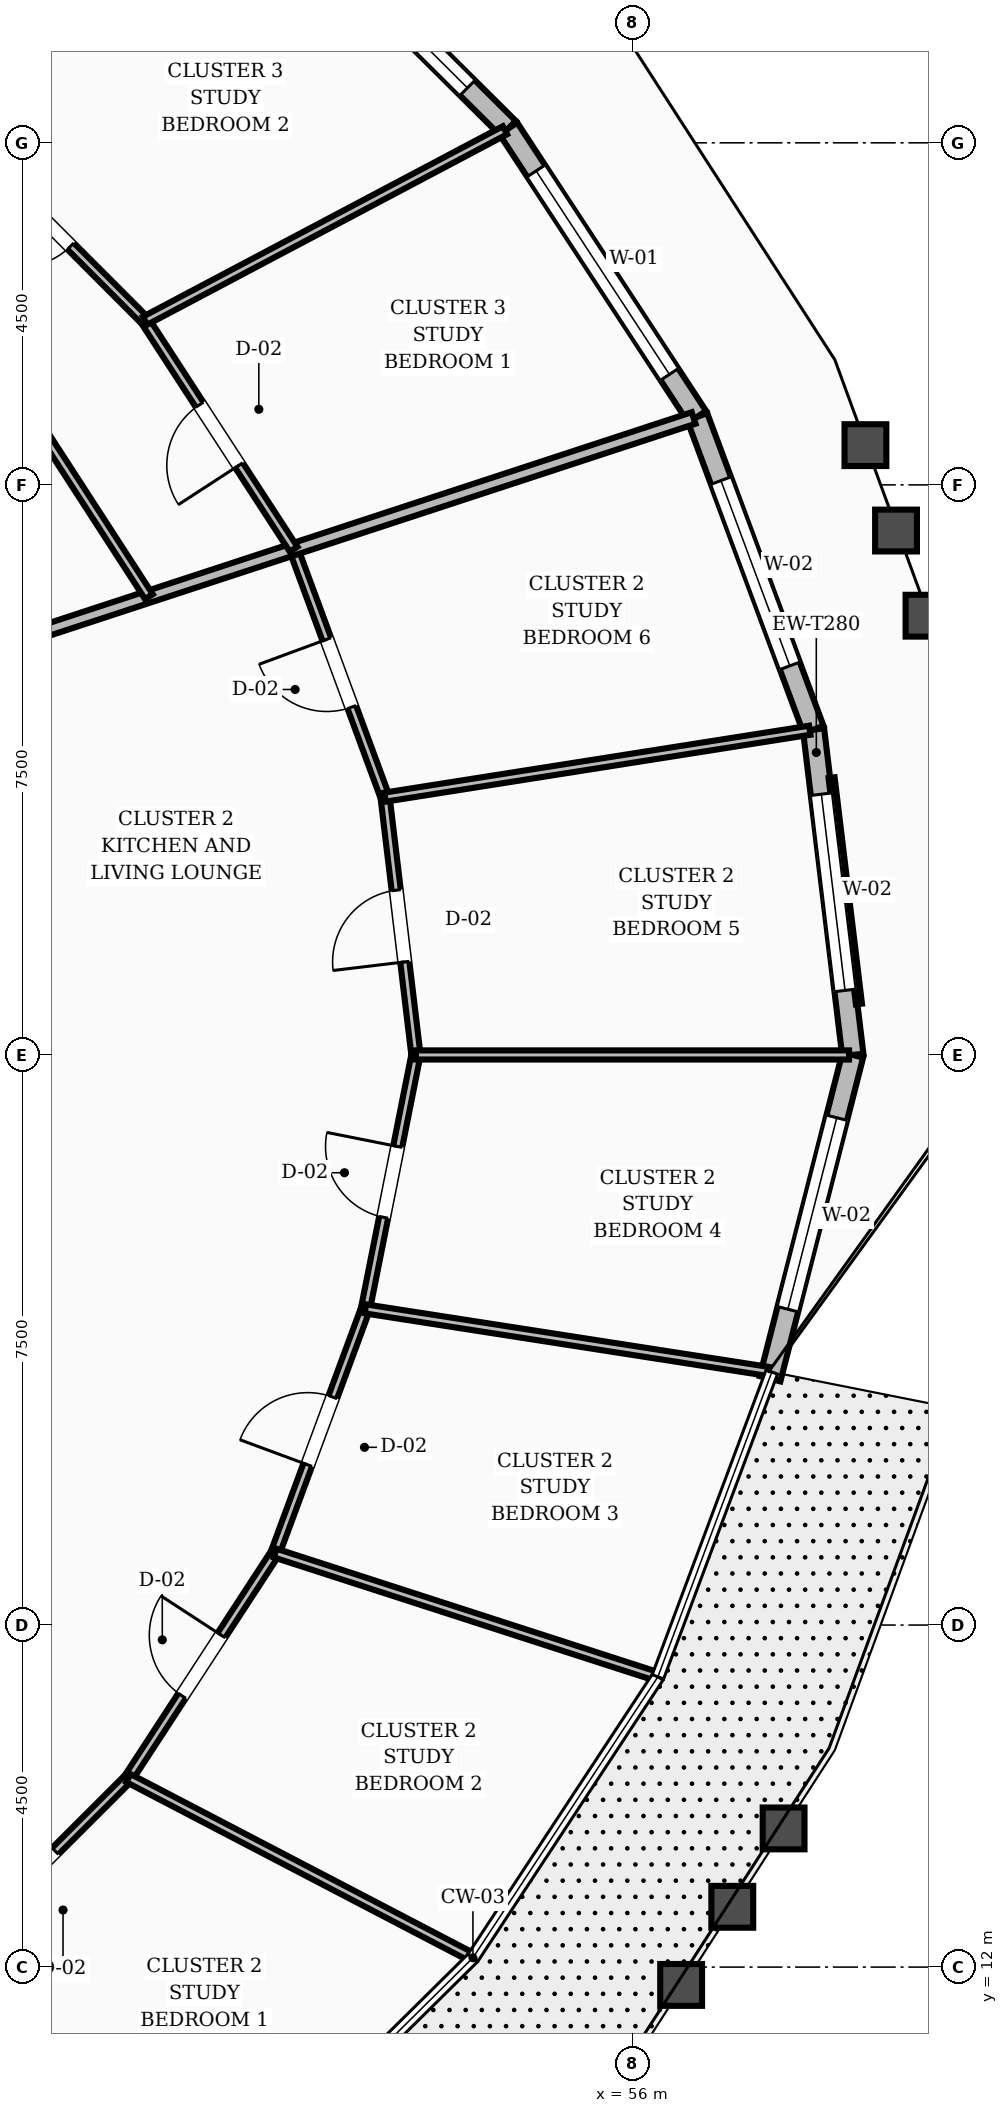
"""IFC4 building model, lengths in metres.
Left out: names, types, materials, properties, quantities, classifications, styles, units other than length and angle.
Written with IfcOpenShell. Run it as: python <this file> out.ifc"""

import sys

from ifc_helpers import new_model, si_unit, direction, frame, frame_2d, origin, place, context, subcontext, project, spatial, rectangle, extrude, element, fill, save


model = new_model("IFC4")
c1 = context("Model", 3, precision=1e-05, world=origin(), true_north=direction((0.0, 1.0)))
c2 = subcontext(c1, "Body", "Model", "MODEL_VIEW")
j1 = project(units=[si_unit("LENGTHUNIT", "METRE"), si_unit("PLANEANGLEUNIT", "RADIAN")], contexts=[c1])
p1 = place(None, origin())
s1 = spatial("IfcSite", under=j1, at=p1, CompositionType="ELEMENT")
p2 = place(p1, origin())
s2 = spatial("IfcBuilding", under=s1, at=p2, CompositionType="ELEMENT")
p3 = place(p2, frame((0.0, 0.0, 98.8)))
s3 = spatial("IfcBuildingStorey", under=s2, at=p3, CompositionType="ELEMENT", Elevation=98.8)
p4 = place(p3, frame((58.895, 24.0, 0.0), z_axis=(0.0, 0.0, 1.0), x_axis=(-0.119886563343, 0.992787596583, 0.0)))
e1 = element("IfcWall", 1, at=p4, inside=s3, PredefinedType="STANDARD", context=c2, shape_type="SweptSolid", body=[
    extrude(rectangle(XDim=4.311, YDim=0.28, at=frame_2d((2.156, 0.0))), origin(), (0.0, 0.0, 1.0), 2.71),
])
p5 = place(p4, frame((0.855, 0.0, 0.8)))
e2 = element("IfcOpeningElement", 2, at=p5, cuts=e1, PredefinedType="OPENING", context=c2, shape_type="SweptSolid", body=[
    extrude(rectangle(XDim=2.6, YDim=1.65, at=frame_2d((1.3, 0.825))), frame((0.0, 0.15, 0.0), z_axis=(0.0, -1.0, 0.0), x_axis=(1.0, 0.0, 0.0)), (0.0, 0.0, 1.0), 0.3),
])
p6 = place(p3, frame((58.378, 28.28, 0.0), z_axis=(0.0, 0.0, 1.0), x_axis=(-0.348569013741, 0.937283117665, 0.0)))
e3 = element("IfcWall", 3, at=p6, inside=s3, PredefinedType="STANDARD", context=c2, shape_type="SweptSolid", body=[
    extrude(rectangle(XDim=4.391, YDim=0.28, at=frame_2d((2.195, 0.0))), origin(), (0.0, 0.0, 1.0), 2.71),
])
p7 = place(p6, frame((0.896, 0.0, 0.8)))
e4 = element("IfcOpeningElement", 4, at=p7, cuts=e3, PredefinedType="OPENING", context=c2, shape_type="SweptSolid", body=[
    extrude(rectangle(XDim=2.6, YDim=1.65, at=frame_2d((1.3, 0.825))), frame((0.0, 0.15, 0.0), z_axis=(0.0, -1.0, 0.0), x_axis=(1.0, 0.0, 0.0)), (0.0, 0.0, 1.0), 0.3),
])
p8 = place(p3, frame((56.848, 32.396, 0.0), z_axis=(0.0, 0.0, 1.0), x_axis=(-0.548073017765, 0.836430491552, 0.0)))
e5 = element("IfcWall", 5, at=p8, inside=s3, PredefinedType="STANDARD", context=c2, shape_type="SweptSolid", body=[
    extrude(rectangle(XDim=4.535, YDim=0.28, at=frame_2d((2.267, 0.0))), origin(), (0.0, 0.0, 1.0), 2.71),
])
p9 = place(p8, frame((0.667, 0.0, 0.8)))
e6 = element("IfcOpeningElement", 6, at=p9, cuts=e5, PredefinedType="OPENING", context=c2, shape_type="SweptSolid", body=[
    extrude(rectangle(XDim=3.2, YDim=1.65, at=frame_2d((1.6, 0.825))), frame((0.0, 0.15, 0.0), z_axis=(0.0, -1.0, 0.0), x_axis=(1.0, 0.0, 0.0)), (0.0, 0.0, 1.0), 0.3),
])
p10 = place(p3, frame((54.362, 36.188, 0.0), z_axis=(0.0, 0.0, 1.0), x_axis=(-0.709251981277, 0.704955053216, 0.0)))
e7 = element("IfcWall", 7, at=p10, inside=s3, PredefinedType="STANDARD", context=c2, shape_type="SweptSolid", body=[
    extrude(rectangle(XDim=4.716, YDim=0.28, at=frame_2d((2.358, 0.0))), origin(), (0.0, 0.0, 1.0), 2.71),
])
p11 = place(p10, frame((0.758, 0.0, 0.8)))
e8 = element("IfcOpeningElement", 8, at=p11, cuts=e7, PredefinedType="OPENING", context=c2, shape_type="SweptSolid", body=[
    extrude(rectangle(XDim=3.2, YDim=1.65, at=frame_2d((1.6, 0.825))), frame((0.0, 0.15, 0.0), z_axis=(0.0, -1.0, 0.0), x_axis=(1.0, 0.0, 0.0)), (0.0, 0.0, 1.0), 0.3),
])
p12 = place(p3, frame((57.806, 19.74, 0.0), z_axis=(0.0, 0.0, 1.0), x_axis=(0.247653865661, 0.968848575797, 0.0)))
e9 = element("IfcWall", 9, at=p12, inside=s3, PredefinedType="STANDARD", context=c2, shape_type="SweptSolid", body=[
    extrude(rectangle(XDim=4.397, YDim=0.28, at=frame_2d((2.198, 0.0))), origin(), (0.0, 0.0, 1.0), 2.71),
])
p13 = place(p12, frame((0.944, 0.0, 0.8)))
e10 = element("IfcOpeningElement", 10, at=p13, cuts=e9, PredefinedType="OPENING", context=c2, shape_type="SweptSolid", body=[
    extrude(rectangle(XDim=2.6, YDim=1.65, at=frame_2d((1.3, 0.825))), frame((0.0, 0.15, 0.0), z_axis=(0.0, -1.0, 0.0), x_axis=(1.0, 0.0, 0.0)), (0.0, 0.0, 1.0), 0.3),
])
p14 = place(p3, frame((43.349, 14.56, 0.0), z_axis=(0.0, 0.0, 1.0), x_axis=(0.788270771637, -0.615328522484, 0.0)))
e11 = element("IfcWall", 11, at=p14, inside=s3, PredefinedType="SOLIDWALL", context=c2, shape_type="SweptSolid", body=[
    extrude(rectangle(XDim=9.176, YDim=0.16, at=frame_2d((4.588, 0.0))), origin(), (0.0, 0.0, 1.0), 2.71),
])
p15 = place(p3, frame((46.767, 11.892, 0.0), z_axis=(0.0, 0.0, 1.0), x_axis=(0.707439177494, 0.706774228553, 0.0)))
e12 = element("IfcWall", 12, at=p15, inside=s3, PredefinedType="PARTITIONING", context=c2, shape_type="SweptSolid", body=[
    extrude(rectangle(XDim=3.672, YDim=0.12, at=frame_2d((1.836, 0.0))), origin(), (0.0, 0.0, 1.0), 2.71),
])
p16 = place(p15, frame((1.361, 0.0, 0.0)))
e13 = element("IfcOpeningElement", 13, at=p16, cuts=e12, PredefinedType="OPENING", context=c2, shape_type="SweptSolid", body=[
    extrude(rectangle(XDim=0.95, YDim=2.1, at=frame_2d((0.475, 1.05))), frame((0.0, 0.07, 0.0), z_axis=(0.0, -1.0, 0.0), x_axis=(1.0, 0.0, 0.0)), (0.0, 0.0, 1.0), 0.14),
])
p17 = place(p3, frame((49.365, 14.487, 0.0), z_axis=(0.0, 0.0, 1.0), x_axis=(0.546061236872, 0.837745262944, 0.0)))
e14 = element("IfcWall", 14, at=p17, inside=s3, PredefinedType="PARTITIONING", context=c2, shape_type="SweptSolid", body=[
    extrude(rectangle(XDim=3.534, YDim=0.12, at=frame_2d((1.767, 0.0))), origin(), (0.0, 0.0, 1.0), 2.71),
])
p18 = place(p17, frame((1.292, 0.0, 0.0)))
e15 = element("IfcOpeningElement", 15, at=p18, cuts=e14, PredefinedType="OPENING", context=c2, shape_type="SweptSolid", body=[
    extrude(rectangle(XDim=0.95, YDim=2.1, at=frame_2d((0.475, 1.05))), frame((0.0, 0.07, 0.0), z_axis=(0.0, -1.0, 0.0), x_axis=(1.0, 0.0, 0.0)), (0.0, 0.0, 1.0), 0.14),
])
p19 = place(p3, frame((49.365, 14.487, 0.0), z_axis=(0.0, 0.0, 1.0), x_axis=(0.886626981738, -0.462485237877, 0.0)))
e16 = element("IfcWall", 16, at=p19, inside=s3, PredefinedType="PARTITIONING", context=c2, shape_type="SweptSolid", body=[
    extrude(rectangle(XDim=5.062, YDim=0.12, at=frame_2d((2.531, 0.0))), origin(), (0.0, 0.0, 1.0), 2.71),
])
p20 = place(p3, frame((51.294, 17.447, 0.0), z_axis=(0.0, 0.0, 1.0), x_axis=(0.347003238875, 0.937863930541, 0.0)))
e17 = element("IfcWall", 17, at=p20, inside=s3, PredefinedType="PARTITIONING", context=c2, shape_type="SweptSolid", body=[
    extrude(rectangle(XDim=3.425, YDim=0.12, at=frame_2d((1.712, 0.0))), origin(), (0.0, 0.0, 1.0), 2.71),
])
p21 = place(p20, frame((1.238, 0.0, 0.0)))
e18 = element("IfcOpeningElement", 18, at=p21, cuts=e17, PredefinedType="OPENING", context=c2, shape_type="SweptSolid", body=[
    extrude(rectangle(XDim=0.95, YDim=2.1, at=frame_2d((0.475, 1.05))), frame((0.0, 0.07, 0.0), z_axis=(0.0, -1.0, 0.0), x_axis=(1.0, 0.0, 0.0)), (0.0, 0.0, 1.0), 0.14),
])
p22 = place(p3, frame((51.294, 17.447, 0.0), z_axis=(0.0, 0.0, 1.0), x_axis=(0.951494646127, -0.307665302548, 0.0)))
e19 = element("IfcWall", 19, at=p22, inside=s3, PredefinedType="PARTITIONING", context=c2, shape_type="SweptSolid", body=[
    extrude(rectangle(XDim=5.243, YDim=0.12, at=frame_2d((2.622, 0.0))), origin(), (0.0, 0.0, 1.0), 2.71),
])
p23 = place(p3, frame((52.483, 20.659, 0.0), z_axis=(0.0, 0.0, 1.0), x_axis=(0.195109771399, 0.98078141148, 0.0)))
e20 = element("IfcWall", 20, at=p23, inside=s3, PredefinedType="PARTITIONING", context=c2, shape_type="SweptSolid", body=[
    extrude(rectangle(XDim=3.406, YDim=0.12, at=frame_2d((1.703, 0.0))), origin(), (0.0, 0.0, 1.0), 2.71),
])
p24 = place(p23, frame((1.228, 0.0, 0.0)))
e21 = element("IfcOpeningElement", 21, at=p24, cuts=e20, PredefinedType="OPENING", context=c2, shape_type="SweptSolid", body=[
    extrude(rectangle(XDim=0.95, YDim=2.1, at=frame_2d((0.475, 1.05))), frame((0.0, 0.07, 0.0), z_axis=(0.0, -1.0, 0.0), x_axis=(1.0, 0.0, 0.0)), (0.0, 0.0, 1.0), 0.14),
])
p25 = place(p3, frame((52.483, 20.659, 0.0), z_axis=(0.0, 0.0, 1.0), x_axis=(0.988157477478, -0.15344314812, 0.0)))
e22 = element("IfcWall", 22, at=p25, inside=s3, PredefinedType="PARTITIONING", context=c2, shape_type="SweptSolid", body=[
    extrude(rectangle(XDim=5.36, YDim=0.12, at=frame_2d((2.68, 0.0))), origin(), (0.0, 0.0, 1.0), 2.71),
])
p26 = place(p3, frame((53.147, 24.0, 0.0), z_axis=(0.0, 0.0, 1.0), x_axis=(-0.118984598137, 0.992896100006, 0.0)))
e23 = element("IfcWall", 23, at=p26, inside=s3, PredefinedType="PARTITIONING", context=c2, shape_type="SweptSolid", body=[
    extrude(rectangle(XDim=3.416, YDim=0.12, at=frame_2d((1.708, 0.0))), origin(), (0.0, 0.0, 1.0), 2.71),
])
p27 = place(p26, frame((1.233, 0.0, 0.0)))
e24 = element("IfcOpeningElement", 24, at=p27, cuts=e23, PredefinedType="OPENING", context=c2, shape_type="SweptSolid", body=[
    extrude(rectangle(XDim=0.95, YDim=2.1, at=frame_2d((0.475, 1.05))), frame((0.0, 0.07, 0.0), z_axis=(0.0, -1.0, 0.0), x_axis=(1.0, 0.0, 0.0)), (0.0, 0.0, 1.0), 0.14),
])
p28 = place(p3, frame((53.147, 24.0, 0.0), z_axis=(0.0, 0.0, 1.0), x_axis=(1.0, 0.0, 0.0)))
e25 = element("IfcWall", 25, at=p28, inside=s3, PredefinedType="PARTITIONING", context=c2, shape_type="SweptSolid", body=[
    extrude(rectangle(XDim=5.698, YDim=0.12, at=frame_2d((2.849, 0.0))), origin(), (0.0, 0.0, 1.0), 2.71),
])
p29 = place(p3, frame((52.741, 27.392, 0.0), z_axis=(0.0, 0.0, 1.0), x_axis=(-0.346154436664, 0.938177545019, 0.0)))
e26 = element("IfcWall", 26, at=p29, inside=s3, PredefinedType="PARTITIONING", context=c2, shape_type="SweptSolid", body=[
    extrude(rectangle(XDim=3.476, YDim=0.12, at=frame_2d((1.738, 0.0))), origin(), (0.0, 0.0, 1.0), 2.71),
])
p30 = place(p29, frame((1.263, 0.0, 0.0)))
e27 = element("IfcOpeningElement", 27, at=p30, cuts=e26, PredefinedType="OPENING", context=c2, shape_type="SweptSolid", body=[
    extrude(rectangle(XDim=0.95, YDim=2.1, at=frame_2d((0.475, 1.05))), frame((0.0, 0.07, 0.0), z_axis=(0.0, -1.0, 0.0), x_axis=(1.0, 0.0, 0.0)), (0.0, 0.0, 1.0), 0.14),
])
p31 = place(p3, frame((52.741, 27.392, 0.0), z_axis=(0.0, 0.0, 1.0), x_axis=(0.987823078451, 0.155581379607, 0.0)))
e28 = element("IfcWall", 28, at=p31, inside=s3, PredefinedType="PARTITIONING", context=c2, shape_type="SweptSolid", body=[
    extrude(rectangle(XDim=5.657, YDim=0.12, at=frame_2d((2.829, 0.0))), origin(), (0.0, 0.0, 1.0), 2.71),
])
p32 = place(p3, frame((46.828, 29.109, 0.0), z_axis=(0.0, 0.0, 1.0), x_axis=(0.950186855509, 0.311680829725, 0.0)))
e29 = element("IfcWall", 29, at=p32, inside=s3, PredefinedType="SOLIDWALL", context=c2, shape_type="SweptSolid", body=[
    extrude(rectangle(XDim=10.495, YDim=0.16, at=frame_2d((5.247, 0.0))), origin(), (0.0, 0.0, 1.0), 2.71),
])
p33 = place(p3, frame((49.634, 30.029, 0.0), z_axis=(0.0, 0.0, 1.0), x_axis=(-0.543556944185, 0.839372294294, 0.0)))
e30 = element("IfcWall", 30, at=p33, inside=s3, PredefinedType="PARTITIONING", context=c2, shape_type="SweptSolid", body=[
    extrude(rectangle(XDim=3.245, YDim=0.12, at=frame_2d((1.623, 0.0))), origin(), (0.0, 0.0, 1.0), 2.71),
])
p34 = place(p3, frame((51.537, 30.654, 0.0), z_axis=(0.0, 0.0, 1.0), x_axis=(-0.545045794667, 0.838406274855, 0.0)))
e31 = element("IfcWall", 31, at=p34, inside=s3, PredefinedType="PARTITIONING", context=c2, shape_type="SweptSolid", body=[
    extrude(rectangle(XDim=3.585, YDim=0.12, at=frame_2d((1.792, 0.0))), origin(), (0.0, 0.0, 1.0), 2.71),
])
p35 = place(p34, frame((1.318, 0.0, 0.0)))
e32 = element("IfcOpeningElement", 32, at=p35, cuts=e31, PredefinedType="OPENING", context=c2, shape_type="SweptSolid", body=[
    extrude(rectangle(XDim=0.95, YDim=2.1, at=frame_2d((0.475, 1.05))), frame((0.0, 0.07, 0.0), z_axis=(0.0, -1.0, 0.0), x_axis=(1.0, 0.0, 0.0)), (0.0, 0.0, 1.0), 0.14),
])
p36 = place(p3, frame((49.583, 33.659, 0.0), z_axis=(0.0, 0.0, 1.0), x_axis=(-0.706450655804, 0.707762298314, 0.0)))
e33 = element("IfcWall", 33, at=p36, inside=s3, PredefinedType="PARTITIONING", context=c2, shape_type="SweptSolid", body=[
    extrude(rectangle(XDim=3.723, YDim=0.12, at=frame_2d((1.861, 0.0))), origin(), (0.0, 0.0, 1.0), 2.71),
])
p37 = place(p36, frame((1.386, 0.0, 0.0)))
e34 = element("IfcOpeningElement", 34, at=p37, cuts=e33, PredefinedType="OPENING", context=c2, shape_type="SweptSolid", body=[
    extrude(rectangle(XDim=0.95, YDim=2.1, at=frame_2d((0.475, 1.05))), frame((0.0, 0.07, 0.0), z_axis=(0.0, -1.0, 0.0), x_axis=(1.0, 0.0, 0.0)), (0.0, 0.0, 1.0), 0.14),
])
p38 = place(p3, frame((49.583, 33.659, 0.0), z_axis=(0.0, 0.0, 1.0), x_axis=(0.883871044987, 0.467730665912, 0.0)))
e35 = element("IfcWall", 35, at=p38, inside=s3, PredefinedType="PARTITIONING", context=c2, shape_type="SweptSolid", body=[
    extrude(rectangle(XDim=5.357, YDim=0.12, at=frame_2d((2.678, 0.0))), origin(), (0.0, 0.0, 1.0), 2.71),
])
p39 = place(p3, frame((46.953, 36.294, 0.0), z_axis=(0.0, 0.0, 1.0), x_axis=(0.783934932715, 0.620842992446, 0.0)))
e36 = element("IfcWall", 36, at=p39, inside=s3, PredefinedType="PARTITIONING", context=c2, shape_type="SweptSolid", body=[
    extrude(rectangle(XDim=5.135, YDim=0.12, at=frame_2d((2.567, 0.0))), origin(), (0.0, 0.0, 1.0), 2.71),
])
p40 = place(p5, origin())
e37 = element("IfcWindow", 37, at=p40, inside=s3, PartitioningType="SINGLE_PANEL", PredefinedType="WINDOW", context=c2, shape_type="SweptSolid", body=[
    extrude(rectangle(XDim=2.6, YDim=1.65, at=frame_2d((1.3, 0.825))), frame((0.0, 0.03, 0.0), z_axis=(0.0, -1.0, 0.0), x_axis=(1.0, 0.0, 0.0)), (0.0, 0.0, 1.0), 0.06),
])
fill(e2, e37)
p41 = place(p7, origin())
e38 = element("IfcWindow", 38, at=p41, inside=s3, PartitioningType="SINGLE_PANEL", PredefinedType="WINDOW", context=c2, shape_type="SweptSolid", body=[
    extrude(rectangle(XDim=2.6, YDim=1.65, at=frame_2d((1.3, 0.825))), frame((0.0, 0.03, 0.0), z_axis=(0.0, -1.0, 0.0), x_axis=(1.0, 0.0, 0.0)), (0.0, 0.0, 1.0), 0.06),
])
fill(e4, e38)
p42 = place(p9, origin())
e39 = element("IfcWindow", 39, at=p42, inside=s3, PartitioningType="SINGLE_PANEL", PredefinedType="WINDOW", context=c2, shape_type="SweptSolid", body=[
    extrude(rectangle(XDim=3.2, YDim=1.65, at=frame_2d((1.6, 0.825))), frame((0.0, 0.03, 0.0), z_axis=(0.0, -1.0, 0.0), x_axis=(1.0, 0.0, 0.0)), (0.0, 0.0, 1.0), 0.06),
])
fill(e6, e39)
p43 = place(p11, origin())
e40 = element("IfcWindow", 40, at=p43, inside=s3, PartitioningType="SINGLE_PANEL", PredefinedType="WINDOW", context=c2, shape_type="SweptSolid", body=[
    extrude(rectangle(XDim=3.2, YDim=1.65, at=frame_2d((1.6, 0.825))), frame((0.0, 0.03, 0.0), z_axis=(0.0, -1.0, 0.0), x_axis=(1.0, 0.0, 0.0)), (0.0, 0.0, 1.0), 0.06),
])
fill(e8, e40)
p44 = place(p13, origin())
e41 = element("IfcWindow", 41, at=p44, inside=s3, PartitioningType="SINGLE_PANEL", PredefinedType="WINDOW", context=c2, shape_type="SweptSolid", body=[
    extrude(rectangle(XDim=2.6, YDim=1.65, at=frame_2d((1.3, 0.825))), frame((0.0, 0.03, 0.0), z_axis=(0.0, -1.0, 0.0), x_axis=(1.0, 0.0, 0.0)), (0.0, 0.0, 1.0), 0.06),
])
fill(e10, e41)
p45 = place(p16, origin())
e42 = element("IfcDoor", 42, at=p45, inside=s3, OperationType="SINGLE_SWING_LEFT", PredefinedType="DOOR", context=c2, shape_type="SweptSolid", body=[
    extrude(rectangle(XDim=0.95, YDim=2.1, at=frame_2d((0.475, 1.05))), frame((0.0, 0.025, 0.0), z_axis=(0.0, -1.0, 0.0), x_axis=(1.0, 0.0, 0.0)), (0.0, 0.0, 1.0), 0.05),
])
fill(e13, e42)
p46 = place(p18, origin())
e43 = element("IfcDoor", 43, at=p46, inside=s3, OperationType="SINGLE_SWING_RIGHT", PredefinedType="DOOR", context=c2, shape_type="SweptSolid", body=[
    extrude(rectangle(XDim=0.95, YDim=2.1, at=frame_2d((0.475, 1.05))), frame((0.0, 0.025, 0.0), z_axis=(0.0, -1.0, 0.0), x_axis=(1.0, 0.0, 0.0)), (0.0, 0.0, 1.0), 0.05),
])
fill(e15, e43)
p47 = place(p21, origin())
e44 = element("IfcDoor", 44, at=p47, inside=s3, OperationType="SINGLE_SWING_LEFT", PredefinedType="DOOR", context=c2, shape_type="SweptSolid", body=[
    extrude(rectangle(XDim=0.95, YDim=2.1, at=frame_2d((0.475, 1.05))), frame((0.0, 0.025, 0.0), z_axis=(0.0, -1.0, 0.0), x_axis=(1.0, 0.0, 0.0)), (0.0, 0.0, 1.0), 0.05),
])
fill(e18, e44)
p48 = place(p24, origin())
e45 = element("IfcDoor", 45, at=p48, inside=s3, OperationType="SINGLE_SWING_RIGHT", PredefinedType="DOOR", context=c2, shape_type="SweptSolid", body=[
    extrude(rectangle(XDim=0.95, YDim=2.1, at=frame_2d((0.475, 1.05))), frame((0.0, 0.025, 0.0), z_axis=(0.0, -1.0, 0.0), x_axis=(1.0, 0.0, 0.0)), (0.0, 0.0, 1.0), 0.05),
])
fill(e21, e45)
p49 = place(p27, origin())
e46 = element("IfcDoor", 46, at=p49, inside=s3, OperationType="SINGLE_SWING_LEFT", PredefinedType="DOOR", context=c2, shape_type="SweptSolid", body=[
    extrude(rectangle(XDim=0.95, YDim=2.1, at=frame_2d((0.475, 1.05))), frame((0.0, 0.025, 0.0), z_axis=(0.0, -1.0, 0.0), x_axis=(1.0, 0.0, 0.0)), (0.0, 0.0, 1.0), 0.05),
])
fill(e24, e46)
p50 = place(p30, origin())
e47 = element("IfcDoor", 47, at=p50, inside=s3, OperationType="SINGLE_SWING_RIGHT", PredefinedType="DOOR", context=c2, shape_type="SweptSolid", body=[
    extrude(rectangle(XDim=0.95, YDim=2.1, at=frame_2d((0.475, 1.05))), frame((0.0, 0.025, 0.0), z_axis=(0.0, -1.0, 0.0), x_axis=(1.0, 0.0, 0.0)), (0.0, 0.0, 1.0), 0.05),
])
fill(e27, e47)
p51 = place(p35, origin())
e48 = element("IfcDoor", 48, at=p51, inside=s3, OperationType="SINGLE_SWING_LEFT", PredefinedType="DOOR", context=c2, shape_type="SweptSolid", body=[
    extrude(rectangle(XDim=0.95, YDim=2.1, at=frame_2d((0.475, 1.05))), frame((0.0, 0.025, 0.0), z_axis=(0.0, -1.0, 0.0), x_axis=(1.0, 0.0, 0.0)), (0.0, 0.0, 1.0), 0.05),
])
fill(e32, e48)
p52 = place(p37, origin())
e49 = element("IfcDoor", 49, at=p52, inside=s3, OperationType="SINGLE_SWING_RIGHT", PredefinedType="DOOR", context=c2, shape_type="SweptSolid", body=[
    extrude(rectangle(XDim=0.95, YDim=2.1, at=frame_2d((0.475, 1.05))), frame((0.0, 0.025, 0.0), z_axis=(0.0, -1.0, 0.0), x_axis=(1.0, 0.0, 0.0)), (0.0, 0.0, 1.0), 0.05),
])
fill(e34, e49)
save(model, sys.argv[1])
